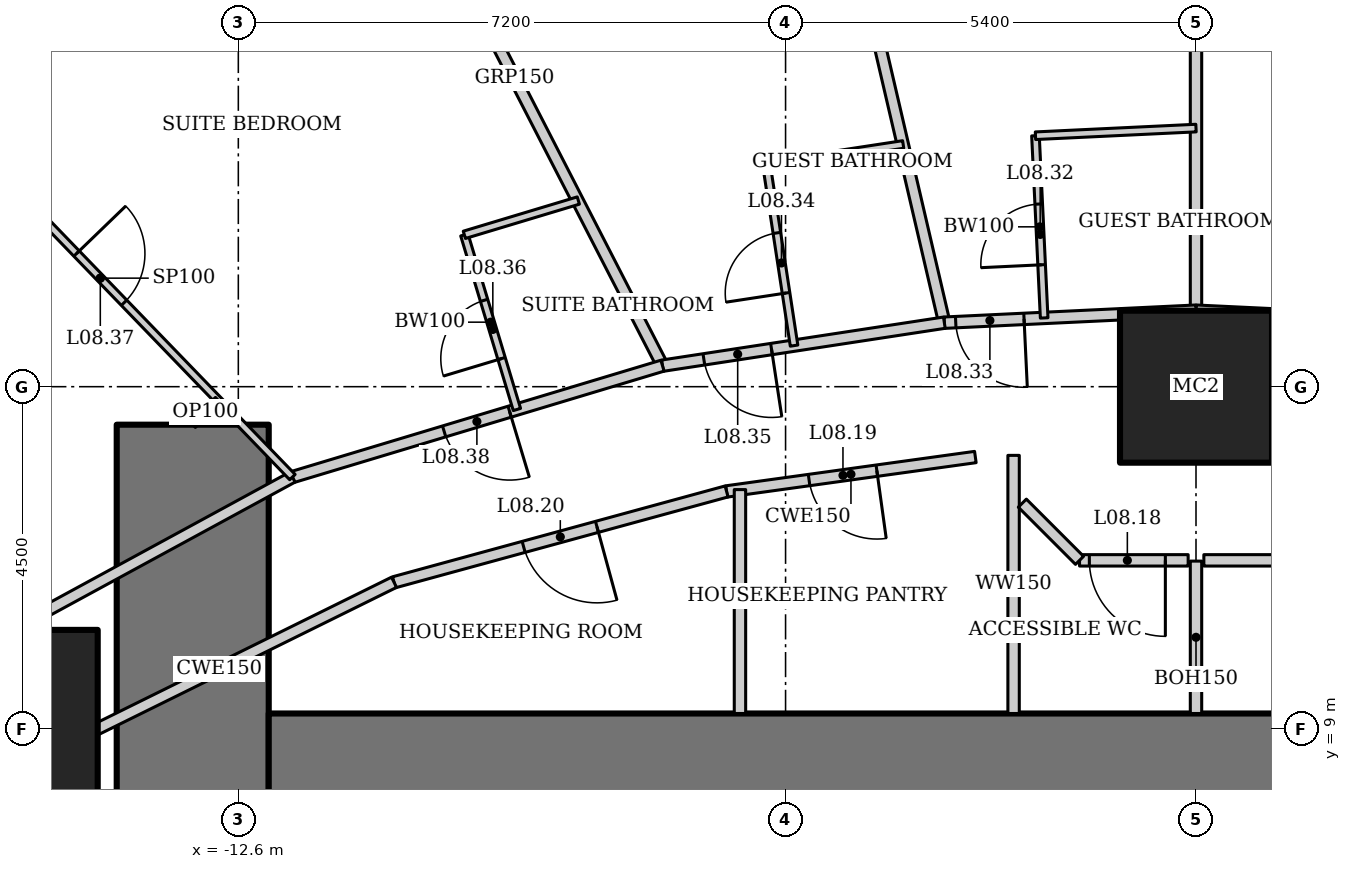
"""IFC4 building model, lengths in metres.
Left out: names, types, materials, properties, quantities, classifications, styles, units other than length and angle.
Written with IfcOpenShell. Run it as: python <this file> out.ifc"""

import sys

from ifc_helpers import new_model, si_unit, direction, frame, frame_2d, origin, origin_2d, place, context, subcontext, project, spatial, rectangle, hollow_rectangle, extrude, element, fill, save


model = new_model("IFC4")
c1 = context("Model", 3, precision=1e-05, world=origin(), true_north=direction((0.0, 1.0)))
c2 = subcontext(c1, "Body", "Model", "MODEL_VIEW")
j1 = project(units=[si_unit("LENGTHUNIT", "METRE"), si_unit("PLANEANGLEUNIT", "RADIAN")], contexts=[c1])
p1 = place(None, origin())
s1 = spatial("IfcSite", under=j1, at=p1, CompositionType="ELEMENT")
p2 = place(p1, origin())
s2 = spatial("IfcBuilding", under=s1, at=p2, CompositionType="ELEMENT")
p3 = place(p2, frame((0.0, 0.0, 44.2)))
s3 = spatial("IfcBuildingStorey", under=s2, at=p3, CompositionType="ELEMENT", Elevation=44.2)
p4 = place(p3, frame((0.0, 13.5, 0.0), z_axis=(0.0, 0.0, 1.0), x_axis=(1.0, 0.0, 0.0)))
e1 = element("IfcColumn", 1, at=p4, inside=s3, PredefinedType="COLUMN", context=c2, shape_type="SweptSolid", body=[
    extrude(hollow_rectangle(XDim=2.0, YDim=2.0, WallThickness=0.17, at=origin_2d()), origin(), (0.0, 0.0, 1.0), 3.6),
])
p5 = place(p3, frame((-15.75, 9.0, 0.0), z_axis=(0.0, 0.0, 1.0), x_axis=(1.0, 0.0, 0.0)))
e2 = element("IfcColumn", 2, at=p5, inside=s3, PredefinedType="COLUMN", context=c2, shape_type="SweptSolid", body=[
    extrude(hollow_rectangle(XDim=2.6, YDim=2.6, WallThickness=0.13, at=origin_2d()), origin(), (0.0, 0.0, 1.0), 3.6),
])
p6 = place(p3, frame((-13.2, 13.0, 0.0), z_axis=(0.0, 0.0, 1.0), x_axis=(0.0, -1.0, 0.0)))
e3 = element("IfcWall", 3, at=p6, inside=s3, PredefinedType="SHEAR", context=c2, shape_type="SweptSolid", body=[
    extrude(rectangle(XDim=26.0, YDim=2.0, at=frame_2d((13.0, 0.0))), origin(), (0.0, 0.0, 1.0), 3.6),
])
p7 = place(p6, frame((12.1, 0.0, 0.0)))
e4 = element("IfcOpeningElement", 4, at=p7, cuts=e3, PredefinedType="OPENING", context=c2, shape_type="SweptSolid", body=[
    extrude(rectangle(XDim=1.8, YDim=2.1, at=frame_2d((0.9, 1.05))), frame((0.0, 1.01, 0.0), z_axis=(0.0, -1.0, 0.0), x_axis=(1.0, 0.0, 0.0)), (0.0, 0.0, 1.0), 2.02),
])
p8 = place(p3, frame((12.2, 8.0, 0.0), z_axis=(0.0, 0.0, 1.0), x_axis=(-1.0, 0.0, 0.0)))
e5 = element("IfcWall", 5, at=p8, inside=s3, PredefinedType="SHEAR", context=c2, shape_type="SweptSolid", body=[
    extrude(rectangle(XDim=24.4, YDim=2.4, at=frame_2d((12.2, 0.0))), origin(), (0.0, 0.0, 1.0), 3.6),
])
p9 = place(p3, frame((0.0, 22.825, 0.0), z_axis=(0.0, 0.0, 1.0), x_axis=(0.0, -1.0, 0.0)))
e6 = element("IfcWall", 6, at=p9, inside=s3, PredefinedType="PARTITIONING", context=c2, shape_type="SweptSolid", body=[
    extrude(rectangle(XDim=8.325, YDim=0.15, at=frame_2d((4.162, 0.0))), origin(), (0.0, 0.0, 1.0), 2.924),
])
p10 = place(p3, frame((-5.211, 22.496, 0.0), z_axis=(0.0, 0.0, 1.0), x_axis=(0.226929086033, -0.973911284416, 0.0)))
e7 = element("IfcWall", 7, at=p10, inside=s3, PredefinedType="PARTITIONING", context=c2, shape_type="SweptSolid", body=[
    extrude(rectangle(XDim=8.372, YDim=0.15, at=frame_2d((4.186, 0.0))), origin(), (0.0, 0.0, 1.0), 2.767),
])
p11 = place(p3, frame((-10.912, 21.346, 0.0), z_axis=(0.0, 0.0, 1.0), x_axis=(0.457327273085, -0.889298468059, 0.0)))
e8 = element("IfcWall", 8, at=p11, inside=s3, PredefinedType="PARTITIONING", context=c2, shape_type="SweptSolid", body=[
    extrude(rectangle(XDim=8.511, YDim=0.15, at=frame_2d((4.256, 0.0))), origin(), (0.0, 0.0, 1.0), 2.528),
])
p12 = place(p3, frame((3.311, 14.342, 0.0), z_axis=(0.0, 0.0, 1.0), x_axis=(-0.998863968075, 0.047652631422, 0.0)))
e9 = element("IfcWall", 9, at=p12, inside=s3, PredefinedType="PARTITIONING", context=c2, shape_type="SweptSolid", body=[
    extrude(rectangle(XDim=3.315, YDim=0.15, at=frame_2d((1.657, 0.0))), origin(), (0.0, 0.0, 1.0), 3.45),
])
p13 = place(p3, frame((0.0, 14.5, 0.0), z_axis=(0.0, 0.0, 1.0), x_axis=(-0.998863968075, -0.047652631422, 0.0)))
e10 = element("IfcWall", 10, at=p13, inside=s3, PredefinedType="PARTITIONING", context=c2, shape_type="SweptSolid", body=[
    extrude(rectangle(XDim=3.315, YDim=0.15, at=frame_2d((1.657, 0.0))), origin(), (0.0, 0.0, 1.0), 3.45),
])
p14 = place(p13, frame((2.265, 0.0, 0.0)))
e11 = element("IfcOpeningElement", 11, at=p14, cuts=e10, PredefinedType="OPENING", context=c2, shape_type="SweptSolid", body=[
    extrude(rectangle(XDim=0.9, YDim=2.1, at=frame_2d((0.45, 1.05))), frame((0.0, 0.085, 0.0), z_axis=(0.0, -1.0, 0.0), x_axis=(1.0, 0.0, 0.0)), (0.0, 0.0, 1.0), 0.17),
])
p15 = place(p3, frame((-3.311, 14.342, 0.0), z_axis=(0.0, 0.0, 1.0), x_axis=(-0.988564270062, -0.150800145746, 0.0)))
e12 = element("IfcWall", 12, at=p15, inside=s3, PredefinedType="PARTITIONING", context=c2, shape_type="SweptSolid", body=[
    extrude(rectangle(XDim=3.751, YDim=0.15, at=frame_2d((1.875, 0.0))), origin(), (0.0, 0.0, 1.0), 3.45),
])
p16 = place(p15, frame((2.3, 0.0, 0.0)))
e13 = element("IfcOpeningElement", 13, at=p16, cuts=e12, PredefinedType="OPENING", context=c2, shape_type="SweptSolid", body=[
    extrude(rectangle(XDim=0.9, YDim=2.1, at=frame_2d((0.45, 1.05))), frame((0.0, 0.085, 0.0), z_axis=(0.0, -1.0, 0.0), x_axis=(1.0, 0.0, 0.0)), (0.0, 0.0, 1.0), 0.17),
])
p17 = place(p3, frame((-7.019, 13.776, 0.0), z_axis=(0.0, 0.0, 1.0), x_axis=(-0.957564241242, -0.288219922793, 0.0)))
e14 = element("IfcWall", 14, at=p17, inside=s3, PredefinedType="PARTITIONING", context=c2, shape_type="SweptSolid", body=[
    extrude(rectangle(XDim=5.085, YDim=0.15, at=frame_2d((2.542, 0.0))), origin(), (0.0, 0.0, 1.0), 3.45),
])
p18 = place(p17, frame((2.1, 0.0, 0.0)))
e15 = element("IfcOpeningElement", 15, at=p18, cuts=e14, PredefinedType="OPENING", context=c2, shape_type="SweptSolid", body=[
    extrude(rectangle(XDim=0.9, YDim=2.1, at=frame_2d((0.45, 1.05))), frame((0.0, 0.085, 0.0), z_axis=(0.0, -1.0, 0.0), x_axis=(1.0, 0.0, 0.0)), (0.0, 0.0, 1.0), 0.17),
])
p19 = place(p3, frame((-11.888, 12.311, 0.0), z_axis=(0.0, 0.0, 1.0), x_axis=(-0.878450059298, -0.477834169267, 0.0)))
e16 = element("IfcWall", 16, at=p19, inside=s3, PredefinedType="PARTITIONING", context=c2, shape_type="SweptSolid", body=[
    extrude(rectangle(XDim=5.631, YDim=0.15, at=frame_2d((2.815, 0.0))), origin(), (0.0, 0.0, 1.0), 3.45),
])
p20 = place(p3, frame((-2.903, 12.574, 0.0), z_axis=(0.0, 0.0, 1.0), x_axis=(-0.990563451353, -0.137054911782, 0.0)))
e17 = element("IfcWall", 17, at=p20, inside=s3, PredefinedType="PARTITIONING", context=c2, shape_type="SweptSolid", body=[
    extrude(rectangle(XDim=3.304, YDim=0.15, at=frame_2d((1.652, 0.0))), origin(), (0.0, 0.0, 1.0), 3.45),
])
p21 = place(p20, frame((1.308, 0.0, 0.0)))
e18 = element("IfcOpeningElement", 18, at=p21, cuts=e17, PredefinedType="OPENING", context=c2, shape_type="SweptSolid", body=[
    extrude(rectangle(XDim=0.9, YDim=2.1, at=frame_2d((0.45, 1.05))), frame((0.0, 0.085, 0.0), z_axis=(0.0, -1.0, 0.0), x_axis=(1.0, 0.0, 0.0)), (0.0, 0.0, 1.0), 0.17),
])
p22 = place(p3, frame((-6.176, 12.122, 0.0), z_axis=(0.0, 0.0, 1.0), x_axis=(-0.964644466646, -0.263554648923, 0.0)))
e19 = element("IfcWall", 19, at=p22, inside=s3, PredefinedType="PARTITIONING", context=c2, shape_type="SweptSolid", body=[
    extrude(rectangle(XDim=4.535, YDim=0.15, at=frame_2d((2.268, 0.0))), origin(), (0.0, 0.0, 1.0), 3.45),
])
p23 = place(p22, frame((1.768, 0.0, 0.0)))
e20 = element("IfcOpeningElement", 20, at=p23, cuts=e19, PredefinedType="OPENING", context=c2, shape_type="SweptSolid", body=[
    extrude(rectangle(XDim=1.0, YDim=2.1, at=frame_2d((0.5, 1.05))), frame((0.0, 0.085, 0.0), z_axis=(0.0, -1.0, 0.0), x_axis=(1.0, 0.0, 0.0)), (0.0, 0.0, 1.0), 0.17),
])
p24 = place(p3, frame((-10.551, 10.926, 0.0), z_axis=(0.0, 0.0, 1.0), x_axis=(-0.89656943448, -0.442903205177, 0.0)))
e21 = element("IfcWall", 21, at=p24, inside=s3, PredefinedType="PARTITIONING", context=c2, shape_type="SweptSolid", body=[
    extrude(rectangle(XDim=5.126, YDim=0.15, at=frame_2d((2.563, 0.0))), origin(), (0.0, 0.0, 1.0), 3.45),
])
p25 = place(p3, frame((-2.4, 9.2, 0.0), z_axis=(0.0, 0.0, 1.0), x_axis=(0.0, 1.0, 0.0)))
e22 = element("IfcWall", 22, at=p25, inside=s3, PredefinedType="SOLIDWALL", context=c2, shape_type="SweptSolid", body=[
    extrude(rectangle(XDim=3.396, YDim=0.15, at=frame_2d((1.698, 0.0))), origin(), (0.0, 0.0, 1.0), 2.767),
])
p26 = place(p3, frame((-6.0, 9.2, 0.0), z_axis=(0.0, 0.0, 1.0), x_axis=(0.0, 1.0, 0.0)))
e23 = element("IfcWall", 23, at=p26, inside=s3, PredefinedType="SOLIDWALL", context=c2, shape_type="SweptSolid", body=[
    extrude(rectangle(XDim=2.946, YDim=0.15, at=frame_2d((1.473, 0.0))), origin(), (0.0, 0.0, 1.0), 3.046),
])
p27 = place(p3, frame((-1.998, 14.405, 0.0), z_axis=(0.0, 0.0, 1.0), x_axis=(-0.047608648396, 0.998866065395, 0.0)))
e24 = element("IfcWall", 24, at=p27, inside=s3, PredefinedType="PARTITIONING", context=c2, shape_type="SweptSolid", body=[
    extrude(rectangle(XDim=2.4, YDim=0.1, at=frame_2d((1.2, 0.0))), origin(), (0.0, 0.0, 1.0), 2.749),
])
p28 = place(p27, frame((0.7, 0.0, 0.0)))
e25 = element("IfcOpeningElement", 25, at=p28, cuts=e24, PredefinedType="OPENING", context=c2, shape_type="SweptSolid", body=[
    extrude(rectangle(XDim=0.8, YDim=2.1, at=frame_2d((0.4, 1.05))), frame((0.0, 0.06, 0.0), z_axis=(0.0, -1.0, 0.0), x_axis=(1.0, 0.0, 0.0)), (0.0, 0.0, 1.0), 0.12),
])
p29 = place(p3, frame((-2.112, 16.802, 0.0), z_axis=(0.0, 0.0, 1.0), x_axis=(0.998862383453, 0.047685835668, 0.0)))
e26 = element("IfcWall", 26, at=p29, inside=s3, PredefinedType="PARTITIONING", context=c2, shape_type="SweptSolid", body=[
    extrude(rectangle(XDim=2.115, YDim=0.1, at=frame_2d((1.057, 0.0))), origin(), (0.0, 0.0, 1.0), 3.45),
])
p30 = place(p3, frame((-5.288, 14.041, 0.0), z_axis=(0.0, 0.0, 1.0), x_axis=(-0.150757550564, 0.988570766788, 0.0)))
e27 = element("IfcWall", 27, at=p30, inside=s3, PredefinedType="PARTITIONING", context=c2, shape_type="SweptSolid", body=[
    extrude(rectangle(XDim=2.4, YDim=0.1, at=frame_2d((1.2, 0.0))), origin(), (0.0, 0.0, 1.0), 3.45),
])
p31 = place(p30, frame((0.7, 0.0, 0.0)))
e28 = element("IfcOpeningElement", 28, at=p31, cuts=e27, PredefinedType="OPENING", context=c2, shape_type="SweptSolid", body=[
    extrude(rectangle(XDim=0.8, YDim=2.1, at=frame_2d((0.4, 1.05))), frame((0.0, 0.06, 0.0), z_axis=(0.0, -1.0, 0.0), x_axis=(1.0, 0.0, 0.0)), (0.0, 0.0, 1.0), 0.12),
])
p32 = place(p3, frame((-5.65, 16.413, 0.0), z_axis=(0.0, 0.0, 1.0), x_axis=(0.988567991054, 0.150775750911, 0.0)))
e29 = element("IfcWall", 29, at=p32, inside=s3, PredefinedType="PARTITIONING", context=c2, shape_type="SweptSolid", body=[
    extrude(rectangle(XDim=1.818, YDim=0.1, at=frame_2d((0.909, 0.0))), origin(), (0.0, 0.0, 1.0), 3.45),
])
p33 = place(p3, frame((-8.935, 13.2, 0.0), z_axis=(0.0, 0.0, 1.0), x_axis=(-0.288197066254, 0.957571120598, 0.0)))
e30 = element("IfcWall", 30, at=p33, inside=s3, PredefinedType="PARTITIONING", context=c2, shape_type="SweptSolid", body=[
    extrude(rectangle(XDim=2.4, YDim=0.1, at=frame_2d((1.2, 0.0))), origin(), (0.0, 0.0, 1.0), 3.45),
])
p34 = place(p33, frame((0.7, 0.0, 0.0)))
e31 = element("IfcOpeningElement", 31, at=p34, cuts=e30, PredefinedType="OPENING", context=c2, shape_type="SweptSolid", body=[
    extrude(rectangle(XDim=0.8, YDim=2.1, at=frame_2d((0.4, 1.05))), frame((0.0, 0.06, 0.0), z_axis=(0.0, -1.0, 0.0), x_axis=(1.0, 0.0, 0.0)), (0.0, 0.0, 1.0), 0.12),
])
p35 = place(p3, frame((-9.626, 15.498, 0.0), z_axis=(0.0, 0.0, 1.0), x_axis=(0.957551231109, 0.288263143328, 0.0)))
e32 = element("IfcWall", 32, at=p35, inside=s3, PredefinedType="PARTITIONING", context=c2, shape_type="SweptSolid", body=[
    extrude(rectangle(XDim=1.566, YDim=0.1, at=frame_2d((0.783, 0.0))), origin(), (0.0, 0.0, 1.0), 3.45),
])
p36 = place(p3, frame((-16.944, 17.545, 0.0), z_axis=(0.0, 0.0, 1.0), x_axis=(0.694669949151, -0.719328618746, 0.0)))
e33 = element("IfcWall", 33, at=p36, inside=s3, PredefinedType="PARTITIONING", context=c2, shape_type="SweptSolid", body=[
    extrude(rectangle(XDim=7.277, YDim=0.1, at=frame_2d((3.639, 0.0))), origin(), (0.0, 0.0, 1.0), 2.528),
])
p37 = place(p36, frame((3.189, 0.0, 0.0)))
e34 = element("IfcOpeningElement", 34, at=p37, cuts=e33, PredefinedType="OPENING", context=c2, shape_type="SweptSolid", body=[
    extrude(rectangle(XDim=0.9, YDim=2.1, at=frame_2d((0.45, 1.05))), frame((0.0, 0.06, 0.0), z_axis=(0.0, -1.0, 0.0), x_axis=(1.0, 0.0, 0.0)), (0.0, 0.0, 1.0), 0.12),
])
p38 = place(p3, frame((-13.2, 13.0, 0.0), z_axis=(0.0, 0.0, 1.0), x_axis=(0.719347134512, 0.69465077562, 0.0)))
e35 = element("IfcWall", 35, at=p38, inside=s3, PredefinedType="PARTITIONING", context=c2, shape_type="SweptSolid", body=[
    extrude(rectangle(XDim=0.465, YDim=0.1, at=frame_2d((0.232, 0.0))), origin(), (0.0, 0.0, 1.0), 3.45),
])
p39 = place(p3, frame((0.0, 9.2, 0.0), z_axis=(0.0, 0.0, 1.0), x_axis=(0.0, 1.0, 0.0)))
e36 = element("IfcWall", 36, at=p39, inside=s3, PredefinedType="PARTITIONING", context=c2, shape_type="SweptSolid", body=[
    extrude(rectangle(XDim=2.005, YDim=0.15, at=frame_2d((1.002, 0.0))), origin(), (0.0, 0.0, 1.0), 3.044),
])
p40 = place(p3, frame((1.532, 11.215, 0.0), z_axis=(0.0, 0.0, 1.0), x_axis=(-1.0, 0.0, 0.0)))
e37 = element("IfcWall", 37, at=p40, inside=s3, PredefinedType="PARTITIONING", context=c2, shape_type="SweptSolid", body=[
    extrude(rectangle(XDim=1.429, YDim=0.15, at=frame_2d((0.714, 0.0))), origin(), (0.0, 0.0, 1.0), 3.45),
])
p41 = place(p3, frame((-0.103, 11.215, 0.0), z_axis=(0.0, 0.0, 1.0), x_axis=(-1.0, 0.0, 0.0)))
e38 = element("IfcWall", 38, at=p41, inside=s3, PredefinedType="PARTITIONING", context=c2, shape_type="SweptSolid", body=[
    extrude(rectangle(XDim=1.429, YDim=0.15, at=frame_2d((0.714, 0.0))), origin(), (0.0, 0.0, 1.0), 3.45),
])
p42 = place(p41, frame((0.3, 0.0, 0.0)))
e39 = element("IfcOpeningElement", 39, at=p42, cuts=e38, PredefinedType="OPENING", context=c2, shape_type="SweptSolid", body=[
    extrude(rectangle(XDim=1.0, YDim=2.1, at=frame_2d((0.5, 1.05))), frame((0.0, 0.085, 0.0), z_axis=(0.0, -1.0, 0.0), x_axis=(1.0, 0.0, 0.0)), (0.0, 0.0, 1.0), 0.17),
])
p43 = place(p3, frame((-1.532, 11.215, 0.0), z_axis=(0.0, 0.0, 1.0), x_axis=(-0.707106781187, 0.707106781187, 0.0)))
e40 = element("IfcWall", 40, at=p43, inside=s3, PredefinedType="PARTITIONING", context=c2, shape_type="SweptSolid", body=[
    extrude(rectangle(XDim=1.064, YDim=0.15, at=frame_2d((0.532, 0.0))), origin(), (0.0, 0.0, 1.0), 3.45),
])
p44 = place(p42, origin())
e41 = element("IfcDoor", 41, at=p44, inside=s3, OperationType="SINGLE_SWING_LEFT", PredefinedType="DOOR", context=c2, shape_type="SweptSolid", body=[
    extrude(rectangle(XDim=1.0, YDim=2.1, at=frame_2d((0.5, 1.05))), frame((0.0, 0.025, 0.0), z_axis=(0.0, -1.0, 0.0), x_axis=(1.0, 0.0, 0.0)), (0.0, 0.0, 1.0), 0.05),
])
fill(e39, e41)
p45 = place(p21, origin())
e42 = element("IfcDoor", 42, at=p45, inside=s3, OperationType="SINGLE_SWING_LEFT", PredefinedType="DOOR", context=c2, shape_type="SweptSolid", body=[
    extrude(rectangle(XDim=0.9, YDim=2.1, at=frame_2d((0.45, 1.05))), frame((0.0, 0.025, 0.0), z_axis=(0.0, -1.0, 0.0), x_axis=(1.0, 0.0, 0.0)), (0.0, 0.0, 1.0), 0.05),
])
fill(e18, e42)
p46 = place(p23, origin())
e43 = element("IfcDoor", 43, at=p46, inside=s3, OperationType="SINGLE_SWING_LEFT", PredefinedType="DOOR", context=c2, shape_type="SweptSolid", body=[
    extrude(rectangle(XDim=1.0, YDim=2.1, at=frame_2d((0.5, 1.05))), frame((0.0, 0.025, 0.0), z_axis=(0.0, -1.0, 0.0), x_axis=(1.0, 0.0, 0.0)), (0.0, 0.0, 1.0), 0.05),
])
fill(e20, e43)
p47 = place(p28, origin())
e44 = element("IfcDoor", 44, at=p47, inside=s3, OperationType="SINGLE_SWING_LEFT", PredefinedType="DOOR", context=c2, shape_type="SweptSolid", body=[
    extrude(rectangle(XDim=0.8, YDim=2.1, at=frame_2d((0.4, 1.05))), frame((0.0, 0.025, 0.0), z_axis=(0.0, -1.0, 0.0), x_axis=(1.0, 0.0, 0.0)), (0.0, 0.0, 1.0), 0.05),
])
fill(e25, e44)
p48 = place(p14, origin())
e45 = element("IfcDoor", 45, at=p48, inside=s3, OperationType="SINGLE_SWING_LEFT", PredefinedType="DOOR", context=c2, shape_type="SweptSolid", body=[
    extrude(rectangle(XDim=0.9, YDim=2.1, at=frame_2d((0.45, 1.05))), frame((0.0, 0.025, 0.0), z_axis=(0.0, -1.0, 0.0), x_axis=(1.0, 0.0, 0.0)), (0.0, 0.0, 1.0), 0.05),
])
fill(e11, e45)
p49 = place(p31, origin())
e46 = element("IfcDoor", 46, at=p49, inside=s3, OperationType="SINGLE_SWING_LEFT", PredefinedType="DOOR", context=c2, shape_type="SweptSolid", body=[
    extrude(rectangle(XDim=0.8, YDim=2.1, at=frame_2d((0.4, 1.05))), frame((0.0, 0.025, 0.0), z_axis=(0.0, -1.0, 0.0), x_axis=(1.0, 0.0, 0.0)), (0.0, 0.0, 1.0), 0.05),
])
fill(e28, e46)
p50 = place(p16, origin())
e47 = element("IfcDoor", 47, at=p50, inside=s3, OperationType="SINGLE_SWING_LEFT", PredefinedType="DOOR", context=c2, shape_type="SweptSolid", body=[
    extrude(rectangle(XDim=0.9, YDim=2.1, at=frame_2d((0.45, 1.05))), frame((0.0, 0.025, 0.0), z_axis=(0.0, -1.0, 0.0), x_axis=(1.0, 0.0, 0.0)), (0.0, 0.0, 1.0), 0.05),
])
fill(e13, e47)
p51 = place(p34, origin())
e48 = element("IfcDoor", 48, at=p51, inside=s3, OperationType="SINGLE_SWING_LEFT", PredefinedType="DOOR", context=c2, shape_type="SweptSolid", body=[
    extrude(rectangle(XDim=0.8, YDim=2.1, at=frame_2d((0.4, 1.05))), frame((0.0, 0.025, 0.0), z_axis=(0.0, -1.0, 0.0), x_axis=(1.0, 0.0, 0.0)), (0.0, 0.0, 1.0), 0.05),
])
fill(e31, e48)
p52 = place(p37, origin())
e49 = element("IfcDoor", 49, at=p52, inside=s3, OperationType="SINGLE_SWING_LEFT", PredefinedType="DOOR", context=c2, shape_type="SweptSolid", body=[
    extrude(rectangle(XDim=0.9, YDim=2.1, at=frame_2d((0.45, 1.05))), frame((0.0, 0.025, 0.0), z_axis=(0.0, -1.0, 0.0), x_axis=(1.0, 0.0, 0.0)), (0.0, 0.0, 1.0), 0.05),
])
fill(e34, e49)
p53 = place(p18, origin())
e50 = element("IfcDoor", 50, at=p53, inside=s3, OperationType="SINGLE_SWING_LEFT", PredefinedType="DOOR", context=c2, shape_type="SweptSolid", body=[
    extrude(rectangle(XDim=0.9, YDim=2.1, at=frame_2d((0.45, 1.05))), frame((0.0, 0.025, 0.0), z_axis=(0.0, -1.0, 0.0), x_axis=(1.0, 0.0, 0.0)), (0.0, 0.0, 1.0), 0.05),
])
fill(e15, e50)
save(model, sys.argv[1])
